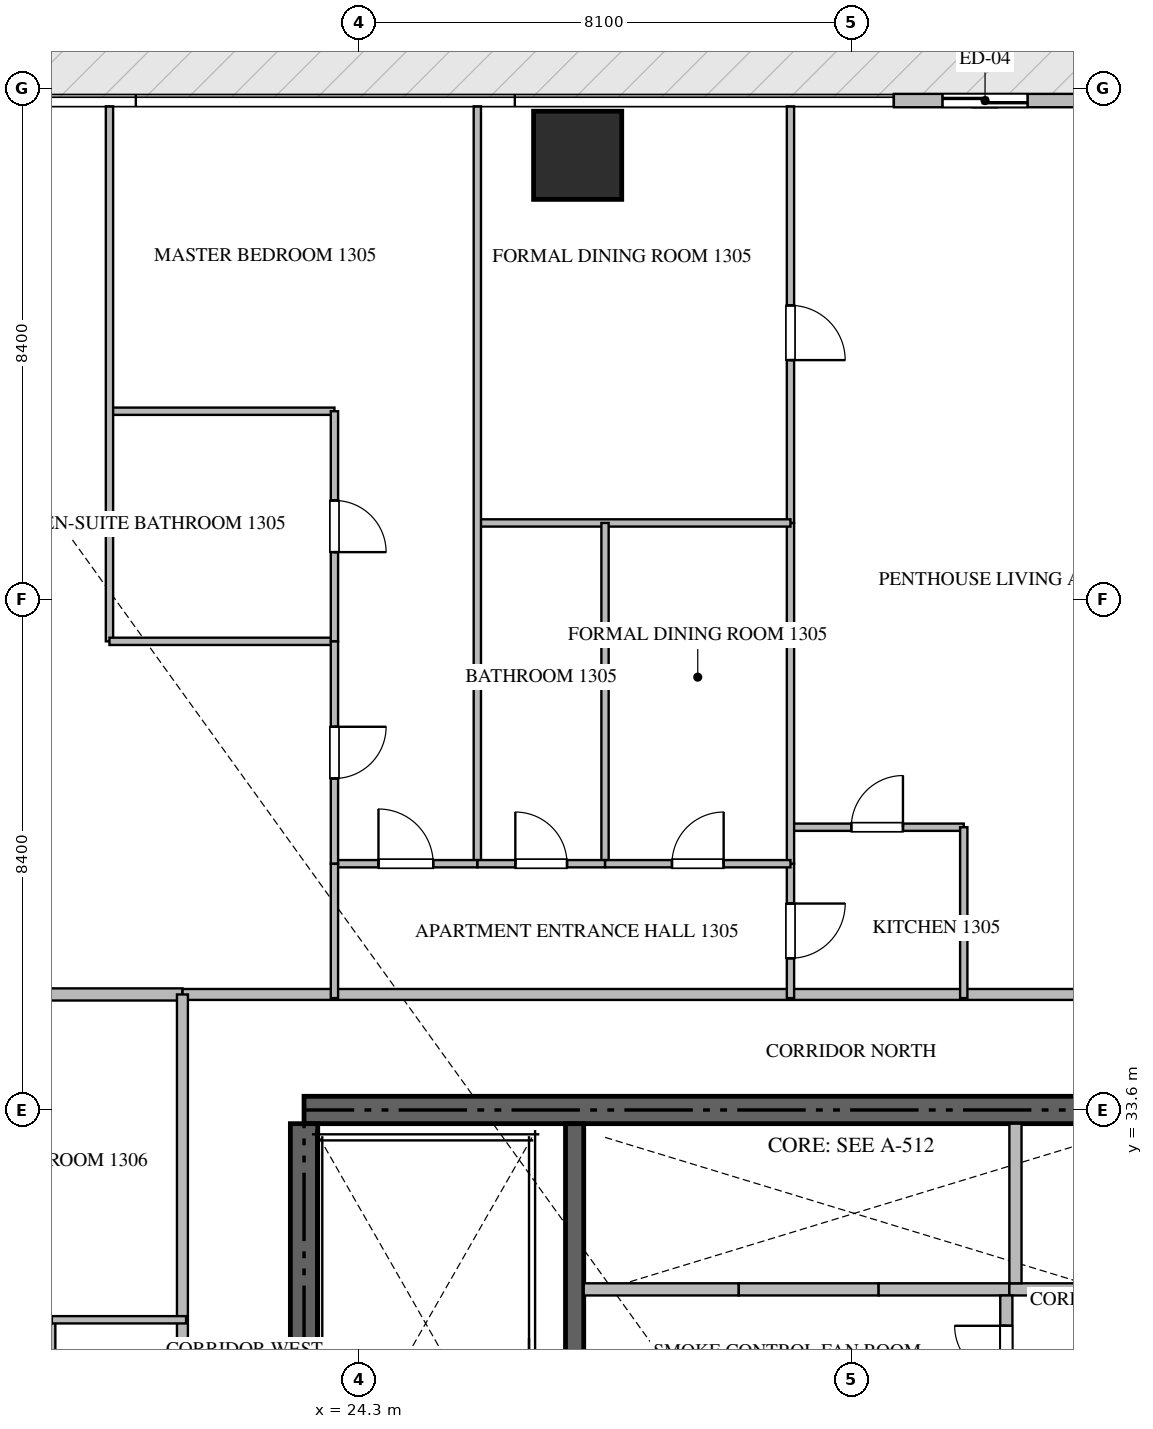
"""IFC4 building model, lengths in metres.
Left out: names, types, materials, properties, quantities, classifications, styles, units other than length and angle.
Written with IfcOpenShell. Run it as: python <this file> out.ifc"""

import sys

from ifc_helpers import new_model, si_unit, direction, frame, frame_2d, origin, origin_2d, place, context, subcontext, project, spatial, rectangle, extrude, source, transform, mapped, element, fill, save


model = new_model("IFC4")
c1 = context("Model", 3, precision=1e-05, world=origin(), true_north=direction((0.0, 1.0)))
c2 = subcontext(c1, "Body", "Model", "MODEL_VIEW")
j1 = project(units=[si_unit("LENGTHUNIT", "METRE"), si_unit("PLANEANGLEUNIT", "RADIAN")], contexts=[c1])
p1 = place(None, origin())
s1 = spatial("IfcSite", under=j1, at=p1, CompositionType="ELEMENT")
p2 = place(p1, origin())
s2 = spatial("IfcBuilding", under=s1, at=p2, CompositionType="ELEMENT")
p3 = place(p2, frame((0.0, 0.0, 56.7)))
s3 = spatial("IfcBuildingStorey", under=s2, at=p3, CompositionType="ELEMENT", Elevation=56.7)
p4 = place(p3, frame((41.4, 33.6, -0.26), z_axis=(0.0, 0.0, 1.0), x_axis=(-1.0, 0.0, 0.0)))
e1 = element("IfcWall", 1, at=p4, inside=s3, PredefinedType="SHEAR", context=c2, shape_type="SweptSolid", body=[
    extrude(rectangle(XDim=18.0, YDim=0.45, at=frame_2d((9.0, 0.0))), origin(), (0.0, 0.0, 1.0), 3.748),
])
p5 = place(p3, frame((23.4, 24.25, -0.26), z_axis=(0.0, 0.0, 1.0), x_axis=(0.0, 1.0, 0.0)))
e2 = element("IfcWall", 2, at=p5, inside=s3, PredefinedType="SHEAR", context=c2, shape_type="SweptSolid", body=[
    extrude(rectangle(XDim=9.125, YDim=0.45, at=frame_2d((4.562, 0.0))), origin(), (0.0, 0.0, 1.0), 3.748),
])
p6 = place(p3, frame((27.85, 23.55, -0.26), z_axis=(0.0, 0.0, 1.0), x_axis=(0.0, 1.0, 0.0)))
e3 = element("IfcWall", 3, at=p6, inside=s3, PredefinedType="SHEAR", context=c2, shape_type="SweptSolid", body=[
    extrude(rectangle(XDim=9.825, YDim=0.3, at=frame_2d((4.913, 0.0))), origin(), (0.0, 0.0, 1.0), 3.748),
])
m1 = source(origin(), c2, "Body", "SweptSolid", [
    extrude(rectangle(XDim=1.45, YDim=1.45, at=origin_2d()), origin(), (0.0, 0.0, 1.0), 3.75),
])
p7 = place(p3, frame((27.9, 49.3, -0.26), z_axis=(0.0, 0.0, 1.0), x_axis=(1.0, 0.0, 0.0)))
e4 = element("IfcColumn", 4, at=p7, inside=s3, PredefinedType="COLUMN", context=c2, shape_type="MappedRepresentation", body=[
    mapped(m1, transform((0.0, 0.0, 0.0), scale=1.0)),
])
p8 = place(p3, frame((36.1, 50.2, 0.0), z_axis=(0.0, 0.0, 1.0), x_axis=(-1.0, 0.0, 0.0)))
e5 = element("IfcWall", 5, at=p8, inside=s3, PredefinedType="ELEMENTEDWALL", context=c2, shape_type="SweptSolid", body=[
    extrude(rectangle(XDim=3.0, YDim=0.22, at=frame_2d((1.5, 0.0))), origin(), (0.0, 0.0, 1.0), 3.475),
])
p9 = place(p8, frame((0.8, 0.0, 0.0)))
e6 = element("IfcOpeningElement", 6, at=p9, cuts=e5, PredefinedType="OPENING", context=c2, shape_type="SweptSolid", body=[
    extrude(rectangle(XDim=1.4, YDim=2.25, at=frame_2d((0.7, 1.125))), frame((0.0, 0.12, 0.0), z_axis=(0.0, -1.0, 0.0), x_axis=(1.0, 0.0, 0.0)), (0.0, 0.0, 1.0), 0.24),
])
p10 = place(p3, frame((28.0, 30.65, 0.0), z_axis=(0.0, 0.0, 1.0), x_axis=(1.0, 0.0, 0.0)))
e7 = element("IfcWall", 7, at=p10, inside=s3, PredefinedType="STANDARD", context=c2, shape_type="SweptSolid", body=[
    extrude(rectangle(XDim=2.55, YDim=0.2, at=frame_2d((1.275, 0.0))), origin(), (0.0, 0.0, 1.0), 3.49),
])
p11 = place(p3, frame((30.55, 30.65, 0.0), z_axis=(0.0, 0.0, 1.0), x_axis=(1.0, 0.0, 0.0)))
e8 = element("IfcWall", 8, at=p11, inside=s3, PredefinedType="STANDARD", context=c2, shape_type="SweptSolid", body=[
    extrude(rectangle(XDim=2.3, YDim=0.2, at=frame_2d((1.15, 0.0))), origin(), (0.0, 0.0, 1.0), 3.49),
])
p12 = place(p3, frame((32.85, 30.65, 0.0), z_axis=(0.0, 0.0, 1.0), x_axis=(1.0, 0.0, 0.0)))
e9 = element("IfcWall", 9, at=p12, inside=s3, PredefinedType="STANDARD", context=c2, shape_type="SweptSolid", body=[
    extrude(rectangle(XDim=2.15, YDim=0.2, at=frame_2d((1.075, 0.0))), origin(), (0.0, 0.0, 1.0), 3.49),
])
p13 = place(p3, frame((35.0, 30.65, 0.0), z_axis=(0.0, 0.0, 1.0), x_axis=(1.0, 0.0, 0.0)))
e10 = element("IfcWall", 10, at=p13, inside=s3, PredefinedType="STANDARD", context=c2, shape_type="SweptSolid", body=[
    extrude(rectangle(XDim=1.8, YDim=0.2, at=frame_2d((0.9, 0.0))), origin(), (0.0, 0.0, 1.0), 3.49),
])
p14 = place(p3, frame((35.1, 30.75, 0.0), z_axis=(0.0, 0.0, 1.0), x_axis=(0.0, 1.0, 0.0)))
e11 = element("IfcWall", 11, at=p14, inside=s3, PredefinedType="STANDARD", context=c2, shape_type="SweptSolid", body=[
    extrude(rectangle(XDim=2.625, YDim=0.2, at=frame_2d((1.312, 0.0))), origin(), (0.0, 0.0, 1.0), 3.49),
])
p15 = place(p3, frame((34.95, 28.702, 0.0), z_axis=(0.0, 0.0, 1.0), x_axis=(0.0, 1.0, 0.0)))
e12 = element("IfcWall", 12, at=p15, inside=s3, PredefinedType="STANDARD", context=c2, shape_type="SweptSolid", body=[
    extrude(rectangle(XDim=1.848, YDim=0.2, at=frame_2d((0.924, 0.0))), origin(), (0.0, 0.0, 1.0), 3.49),
])
p16 = place(p15, frame((0.499, 0.0, 0.0)))
e13 = element("IfcOpeningElement", 13, at=p16, cuts=e12, PredefinedType="OPENING", context=c2, shape_type="SweptSolid", body=[
    extrude(rectangle(XDim=0.85, YDim=2.1, at=frame_2d((0.425, 1.05))), frame((0.0, 0.11, 0.0), z_axis=(0.0, -1.0, 0.0), x_axis=(1.0, 0.0, 0.0)), (0.0, 0.0, 1.0), 0.22),
])
p17 = place(p3, frame((6.082, 35.5, 0.0), z_axis=(0.0, 0.0, 1.0), x_axis=(1.0, 0.0, 0.0)))
e14 = element("IfcWall", 14, at=p17, inside=s3, PredefinedType="PARTITIONING", context=c2, shape_type="SweptSolid", body=[
    extrude(rectangle(XDim=15.318, YDim=0.2, at=frame_2d((7.659, 0.0))), origin(), (0.0, 0.0, 1.0), 3.49),
])
p18 = place(p3, frame((21.402, 35.5, 0.0), z_axis=(0.0, 0.0, 1.0), x_axis=(1.0, 0.0, 0.0)))
e15 = element("IfcWall", 15, at=p18, inside=s3, PredefinedType="PARTITIONING", context=c2, shape_type="SweptSolid", body=[
    extrude(rectangle(XDim=21.996, YDim=0.18, at=frame_2d((10.998, 0.0))), origin(), (0.0, 0.0, 1.0), 3.49),
])
p19 = place(p18, frame((15.222, 0.0, 0.0)))
e16 = element("IfcOpeningElement", 16, at=p19, cuts=e15, PredefinedType="OPENING", context=c2, shape_type="SweptSolid", body=[
    extrude(rectangle(XDim=1.0, YDim=2.15, at=frame_2d((0.5, 1.075))), frame((0.0, 0.1, 0.0), z_axis=(0.0, -1.0, 0.0), x_axis=(1.0, 0.0, 0.0)), (0.0, 0.0, 1.0), 0.2),
])
p20 = place(p3, frame((21.4, 14.9, 0.0), z_axis=(0.0, 0.0, 1.0), x_axis=(0.0, 1.0, 0.0)))
e17 = element("IfcWall", 17, at=p20, inside=s3, PredefinedType="PARTITIONING", context=c2, shape_type="SweptSolid", body=[
    extrude(rectangle(XDim=20.6, YDim=0.18, at=frame_2d((10.3, 0.0))), origin(), (0.0, 0.0, 1.0), 3.49),
])
p21 = place(p20, frame((1.96, 0.0, 0.0)))
e18 = element("IfcOpeningElement", 18, at=p21, cuts=e17, PredefinedType="OPENING", context=c2, shape_type="SweptSolid", body=[
    extrude(rectangle(XDim=1.0, YDim=2.15, at=frame_2d((0.5, 1.075))), frame((0.0, 0.1, 0.0), z_axis=(0.0, -1.0, 0.0), x_axis=(1.0, 0.0, 0.0)), (0.0, 0.0, 1.0), 0.2),
])
p22 = place(p3, frame((31.4, 38.25, 0.0), z_axis=(0.0, 0.0, 1.0), x_axis=(1.0, 0.0, 0.0)))
e19 = element("IfcWall", 19, at=p22, inside=s3, PredefinedType="PARTITIONING", context=c2, shape_type="SweptSolid", body=[
    extrude(rectangle(XDim=2.85, YDim=0.12, at=frame_2d((1.425, 0.0))), origin(), (0.0, 0.0, 1.0), 3.49),
])
p23 = place(p22, frame((1.0, 0.0, 0.0)))
e20 = element("IfcOpeningElement", 20, at=p23, cuts=e19, PredefinedType="OPENING", context=c2, shape_type="SweptSolid", body=[
    extrude(rectangle(XDim=0.85, YDim=2.1, at=frame_2d((0.425, 1.05))), frame((0.0, 0.07, 0.0), z_axis=(0.0, -1.0, 0.0), x_axis=(1.0, 0.0, 0.0)), (0.0, 0.0, 1.0), 0.14),
])
p24 = place(p3, frame((34.25, 38.25, 0.0), z_axis=(0.0, 0.0, 1.0), x_axis=(0.0, -1.0, 0.0)))
e21 = element("IfcWall", 21, at=p24, inside=s3, PredefinedType="PARTITIONING", context=c2, shape_type="SweptSolid", body=[
    extrude(rectangle(XDim=2.81, YDim=0.12, at=frame_2d((1.405, 0.0))), origin(), (0.0, 0.0, 1.0), 3.49),
])
p25 = place(p3, frame((31.4, 37.65, 0.0), z_axis=(0.0, 0.0, 1.0), x_axis=(0.0, -1.0, 0.0)))
e22 = element("IfcWall", 22, at=p25, inside=s3, PredefinedType="PARTITIONING", context=c2, shape_type="SweptSolid", body=[
    extrude(rectangle(XDim=2.21, YDim=0.12, at=frame_2d((1.105, 0.0))), origin(), (0.0, 0.0, 1.0), 3.49),
])
p26 = place(p25, frame((0.655, 0.0, 0.0)))
e23 = element("IfcOpeningElement", 23, at=p26, cuts=e22, PredefinedType="OPENING", context=c2, shape_type="SweptSolid", body=[
    extrude(rectangle(XDim=0.9, YDim=2.1, at=frame_2d((0.45, 1.05))), frame((0.0, 0.07, 0.0), z_axis=(0.0, -1.0, 0.0), x_axis=(1.0, 0.0, 0.0)), (0.0, 0.0, 1.0), 0.14),
])
p27 = place(p3, frame((31.4, 50.105, 0.0), z_axis=(0.0, 0.0, 1.0), x_axis=(0.0, -1.0, 0.0)))
e24 = element("IfcWall", 24, at=p27, inside=s3, PredefinedType="PARTITIONING", context=c2, shape_type="SweptSolid", body=[
    extrude(rectangle(XDim=6.851, YDim=0.12, at=frame_2d((3.426, 0.0))), origin(), (0.0, 0.0, 1.0), 3.49),
])
p28 = place(p27, frame((3.273, 0.0, 0.0)))
e25 = element("IfcOpeningElement", 25, at=p28, cuts=e24, PredefinedType="OPENING", context=c2, shape_type="SweptSolid", body=[
    extrude(rectangle(XDim=0.9, YDim=2.1, at=frame_2d((0.45, 1.05))), frame((0.0, 0.07, 0.0), z_axis=(0.0, -1.0, 0.0), x_axis=(1.0, 0.0, 0.0)), (0.0, 0.0, 1.0), 0.14),
])
p29 = place(p3, frame((31.4, 43.252, 0.0), z_axis=(0.0, 0.0, 1.0), x_axis=(0.0, -1.0, 0.0)))
e26 = element("IfcWall", 26, at=p29, inside=s3, PredefinedType="PARTITIONING", context=c2, shape_type="SweptSolid", body=[
    extrude(rectangle(XDim=5.6, YDim=0.12, at=frame_2d((2.8, 0.0))), origin(), (0.0, 0.0, 1.0), 3.49),
])
p30 = place(p3, frame((26.25, 43.254, 0.0), z_axis=(0.0, 0.0, 1.0), x_axis=(1.0, 0.0, 0.0)))
e27 = element("IfcWall", 27, at=p30, inside=s3, PredefinedType="PARTITIONING", context=c2, shape_type="SweptSolid", body=[
    extrude(rectangle(XDim=5.15, YDim=0.12, at=frame_2d((2.575, 0.0))), origin(), (0.0, 0.0, 1.0), 3.49),
])
p31 = place(p3, frame((26.25, 50.105, 0.0), z_axis=(0.0, 0.0, 1.0), x_axis=(0.0, -1.0, 0.0)))
e28 = element("IfcWall", 28, at=p31, inside=s3, PredefinedType="PARTITIONING", context=c2, shape_type="SweptSolid", body=[
    extrude(rectangle(XDim=12.455, YDim=0.12, at=frame_2d((6.228, 0.0))), origin(), (0.0, 0.0, 1.0), 3.49),
])
p32 = place(p3, frame((28.35, 43.254, 0.0), z_axis=(0.0, 0.0, 1.0), x_axis=(0.0, -1.0, 0.0)))
e29 = element("IfcWall", 29, at=p32, inside=s3, PredefinedType="PARTITIONING", context=c2, shape_type="SweptSolid", body=[
    extrude(rectangle(XDim=5.604, YDim=0.12, at=frame_2d((2.802, 0.0))), origin(), (0.0, 0.0, 1.0), 3.49),
])
p33 = place(p3, frame((26.25, 37.65, 0.0), z_axis=(0.0, 0.0, 1.0), x_axis=(1.0, 0.0, 0.0)))
e30 = element("IfcWall", 30, at=p33, inside=s3, PredefinedType="PARTITIONING", context=c2, shape_type="SweptSolid", body=[
    extrude(rectangle(XDim=2.1, YDim=0.12, at=frame_2d((1.05, 0.0))), origin(), (0.0, 0.0, 1.0), 3.49),
])
p34 = place(p33, frame((0.625, 0.0, 0.0)))
e31 = element("IfcOpeningElement", 31, at=p34, cuts=e30, PredefinedType="OPENING", context=c2, shape_type="SweptSolid", body=[
    extrude(rectangle(XDim=0.85, YDim=2.1, at=frame_2d((0.425, 1.05))), frame((0.0, 0.07, 0.0), z_axis=(0.0, -1.0, 0.0), x_axis=(1.0, 0.0, 0.0)), (0.0, 0.0, 1.0), 0.14),
])
p35 = place(p3, frame((28.352, 37.65, 0.0), z_axis=(0.0, 0.0, 1.0), x_axis=(1.0, 0.0, 0.0)))
e32 = element("IfcWall", 32, at=p35, inside=s3, PredefinedType="PARTITIONING", context=c2, shape_type="SweptSolid", body=[
    extrude(rectangle(XDim=3.048, YDim=0.12, at=frame_2d((1.524, 0.0))), origin(), (0.0, 0.0, 1.0), 3.49),
])
p36 = place(p35, frame((1.099, 0.0, 0.0)))
e33 = element("IfcOpeningElement", 33, at=p36, cuts=e32, PredefinedType="OPENING", context=c2, shape_type="SweptSolid", body=[
    extrude(rectangle(XDim=0.85, YDim=2.1, at=frame_2d((0.425, 1.05))), frame((0.0, 0.07, 0.0), z_axis=(0.0, -1.0, 0.0), x_axis=(1.0, 0.0, 0.0)), (0.0, 0.0, 1.0), 0.14),
])
p37 = place(p3, frame((23.9, 37.65, 0.0), z_axis=(0.0, 0.0, 1.0), x_axis=(1.0, 0.0, 0.0)))
e34 = element("IfcWall", 34, at=p37, inside=s3, PredefinedType="PARTITIONING", context=c2, shape_type="SweptSolid", body=[
    extrude(rectangle(XDim=2.348, YDim=0.12, at=frame_2d((1.174, 0.0))), origin(), (0.0, 0.0, 1.0), 3.49),
])
p38 = place(p37, frame((0.724, 0.0, 0.0)))
e35 = element("IfcOpeningElement", 35, at=p38, cuts=e34, PredefinedType="OPENING", context=c2, shape_type="SweptSolid", body=[
    extrude(rectangle(XDim=0.9, YDim=2.1, at=frame_2d((0.45, 1.05))), frame((0.0, 0.07, 0.0), z_axis=(0.0, -1.0, 0.0), x_axis=(1.0, 0.0, 0.0)), (0.0, 0.0, 1.0), 0.14),
])
p39 = place(p3, frame((20.2, 45.091, 0.0), z_axis=(0.0, 0.0, 1.0), x_axis=(1.0, 0.0, 0.0)))
e36 = element("IfcWall", 36, at=p39, inside=s3, PredefinedType="PARTITIONING", context=c2, shape_type="SweptSolid", body=[
    extrude(rectangle(XDim=3.7, YDim=0.12, at=frame_2d((1.85, 0.0))), origin(), (0.0, 0.0, 1.0), 3.49),
])
p40 = place(p3, frame((20.2, 50.105, 0.0), z_axis=(0.0, 0.0, 1.0), x_axis=(0.0, -1.0, 0.0)))
e37 = element("IfcWall", 37, at=p40, inside=s3, PredefinedType="PARTITIONING", context=c2, shape_type="SweptSolid", body=[
    extrude(rectangle(XDim=8.798, YDim=0.12, at=frame_2d((4.399, 0.0))), origin(), (0.0, 0.0, 1.0), 3.49),
])
p41 = place(p3, frame((20.2, 41.307, 0.0), z_axis=(0.0, 0.0, 1.0), x_axis=(1.0, 0.0, 0.0)))
e38 = element("IfcWall", 38, at=p41, inside=s3, PredefinedType="PARTITIONING", context=c2, shape_type="SweptSolid", body=[
    extrude(rectangle(XDim=3.7, YDim=0.12, at=frame_2d((1.85, 0.0))), origin(), (0.0, 0.0, 1.0), 3.49),
])
p42 = place(p3, frame((23.9, 45.091, 0.0), z_axis=(0.0, 0.0, 1.0), x_axis=(0.0, -1.0, 0.0)))
e39 = element("IfcWall", 39, at=p42, inside=s3, PredefinedType="PARTITIONING", context=c2, shape_type="SweptSolid", body=[
    extrude(rectangle(XDim=3.784, YDim=0.12, at=frame_2d((1.892, 0.0))), origin(), (0.0, 0.0, 1.0), 3.49),
])
p43 = place(p42, frame((1.467, 0.0, 0.0)))
e40 = element("IfcOpeningElement", 40, at=p43, cuts=e39, PredefinedType="OPENING", context=c2, shape_type="SweptSolid", body=[
    extrude(rectangle(XDim=0.85, YDim=2.1, at=frame_2d((0.425, 1.05))), frame((0.0, 0.07, 0.0), z_axis=(0.0, -1.0, 0.0), x_axis=(1.0, 0.0, 0.0)), (0.0, 0.0, 1.0), 0.14),
])
p44 = place(p3, frame((23.9, 41.305, 0.0), z_axis=(0.0, 0.0, 1.0), x_axis=(0.0, -1.0, 0.0)))
e41 = element("IfcWall", 41, at=p44, inside=s3, PredefinedType="PARTITIONING", context=c2, shape_type="SweptSolid", body=[
    extrude(rectangle(XDim=3.655, YDim=0.12, at=frame_2d((1.828, 0.0))), origin(), (0.0, 0.0, 1.0), 3.49),
])
p45 = place(p44, frame((1.403, 0.0, 0.0)))
e42 = element("IfcOpeningElement", 42, at=p45, cuts=e41, PredefinedType="OPENING", context=c2, shape_type="SweptSolid", body=[
    extrude(rectangle(XDim=0.85, YDim=2.1, at=frame_2d((0.425, 1.05))), frame((0.0, 0.07, 0.0), z_axis=(0.0, -1.0, 0.0), x_axis=(1.0, 0.0, 0.0)), (0.0, 0.0, 1.0), 0.14),
])
p46 = place(p3, frame((23.9, 37.648, 0.0), z_axis=(0.0, 0.0, 1.0), x_axis=(0.0, -1.0, 0.0)))
e43 = element("IfcWall", 43, at=p46, inside=s3, PredefinedType="PARTITIONING", context=c2, shape_type="SweptSolid", body=[
    extrude(rectangle(XDim=2.208, YDim=0.12, at=frame_2d((1.104, 0.0))), origin(), (0.0, 0.0, 1.0), 3.49),
])
p47 = place(p3, frame((19.25, 27.802, 0.0), z_axis=(0.0, 0.0, 1.0), x_axis=(0.0, 1.0, 0.0)))
e44 = element("IfcWall", 44, at=p47, inside=s3, PredefinedType="PARTITIONING", context=c2, shape_type="SweptSolid", body=[
    extrude(rectangle(XDim=2.348, YDim=0.12, at=frame_2d((1.174, 0.0))), origin(), (0.0, 0.0, 1.0), 3.49),
])
p48 = place(p47, frame((0.724, 0.0, 0.0)))
e45 = element("IfcOpeningElement", 45, at=p48, cuts=e44, PredefinedType="OPENING", context=c2, shape_type="SweptSolid", body=[
    extrude(rectangle(XDim=0.9, YDim=2.1, at=frame_2d((0.45, 1.05))), frame((0.0, 0.07, 0.0), z_axis=(0.0, -1.0, 0.0), x_axis=(1.0, 0.0, 0.0)), (0.0, 0.0, 1.0), 0.14),
])
p49 = place(p3, frame((19.252, 30.15, 0.0), z_axis=(0.0, 0.0, 1.0), x_axis=(1.0, 0.0, 0.0)))
e46 = element("IfcWall", 46, at=p49, inside=s3, PredefinedType="PARTITIONING", context=c2, shape_type="SweptSolid", body=[
    extrude(rectangle(XDim=2.208, YDim=0.12, at=frame_2d((1.104, 0.0))), origin(), (0.0, 0.0, 1.0), 3.49),
])
m2 = source(origin(), c2, "Body", "SweptSolid", [
    extrude(rectangle(XDim=1.4, YDim=2.25, at=frame_2d((0.7, 1.125))), frame((0.0, 0.025, 0.0), z_axis=(0.0, -1.0, 0.0), x_axis=(1.0, 0.0, 0.0)), (0.0, 0.0, 1.0), 0.05),
])
p50 = place(p9, origin())
e47 = element("IfcDoor", 47, at=p50, inside=s3, OperationType="SLIDING_TO_LEFT", PredefinedType="DOOR", context=c2, shape_type="MappedRepresentation", body=[
    mapped(m2, transform((0.0, 0.0, 0.0), scale=1.0)),
])
fill(e6, e47)
m3 = source(origin(), c2, "Body", "SweptSolid", [
    extrude(rectangle(XDim=0.85, YDim=2.1, at=frame_2d((0.425, 1.05))), frame((0.0, 0.025, 0.0), z_axis=(0.0, -1.0, 0.0), x_axis=(1.0, 0.0, 0.0)), (0.0, 0.0, 1.0), 0.05),
])
p51 = place(p16, origin())
e48 = element("IfcDoor", 48, at=p51, inside=s3, OperationType="SINGLE_SWING_RIGHT", PredefinedType="DOOR", context=c2, shape_type="MappedRepresentation", body=[
    mapped(m3, transform((0.0, 0.0, 0.0), scale=1.0)),
])
fill(e13, e48)
p52 = place(p23, origin())
e49 = element("IfcDoor", 49, at=p52, inside=s3, OperationType="SINGLE_SWING_RIGHT", PredefinedType="DOOR", context=c2, shape_type="MappedRepresentation", body=[
    mapped(m3, transform((0.0, 0.0, 0.0), scale=1.0)),
])
fill(e20, e49)
m4 = source(origin(), c2, "Body", "SweptSolid", [
    extrude(rectangle(XDim=0.9, YDim=2.1, at=frame_2d((0.45, 1.05))), frame((0.0, 0.025, 0.0), z_axis=(0.0, -1.0, 0.0), x_axis=(1.0, 0.0, 0.0)), (0.0, 0.0, 1.0), 0.05),
])
p53 = place(p26, origin())
e50 = element("IfcDoor", 50, at=p53, inside=s3, OperationType="SINGLE_SWING_LEFT", PredefinedType="DOOR", context=c2, shape_type="MappedRepresentation", body=[
    mapped(m4, transform((0.0, 0.0, 0.0), scale=1.0)),
])
fill(e23, e50)
p54 = place(p28, origin())
e51 = element("IfcDoor", 51, at=p54, inside=s3, OperationType="SINGLE_SWING_RIGHT", PredefinedType="DOOR", context=c2, shape_type="MappedRepresentation", body=[
    mapped(m4, transform((0.0, 0.0, 0.0), scale=1.0)),
])
fill(e25, e51)
p55 = place(p34, origin())
e52 = element("IfcDoor", 52, at=p55, inside=s3, OperationType="SINGLE_SWING_LEFT", PredefinedType="DOOR", context=c2, shape_type="MappedRepresentation", body=[
    mapped(m3, transform((0.0, 0.0, 0.0), scale=1.0)),
])
fill(e31, e52)
p56 = place(p36, origin())
e53 = element("IfcDoor", 53, at=p56, inside=s3, OperationType="SINGLE_SWING_RIGHT", PredefinedType="DOOR", context=c2, shape_type="MappedRepresentation", body=[
    mapped(m3, transform((0.0, 0.0, 0.0), scale=1.0)),
])
fill(e33, e53)
p57 = place(p38, origin())
e54 = element("IfcDoor", 54, at=p57, inside=s3, OperationType="SINGLE_SWING_LEFT", PredefinedType="DOOR", context=c2, shape_type="MappedRepresentation", body=[
    mapped(m4, transform((0.0, 0.0, 0.0), scale=1.0)),
])
fill(e35, e54)
p58 = place(p43, origin())
e55 = element("IfcDoor", 55, at=p58, inside=s3, OperationType="SINGLE_SWING_RIGHT", PredefinedType="DOOR", context=c2, shape_type="MappedRepresentation", body=[
    mapped(m3, transform((0.0, 0.0, 0.0), scale=1.0)),
])
fill(e40, e55)
p59 = place(p45, origin())
e56 = element("IfcDoor", 56, at=p59, inside=s3, OperationType="SINGLE_SWING_LEFT", PredefinedType="DOOR", context=c2, shape_type="MappedRepresentation", body=[
    mapped(m3, transform((0.0, 0.0, 0.0), scale=1.0)),
])
fill(e42, e56)
save(model, sys.argv[1])
